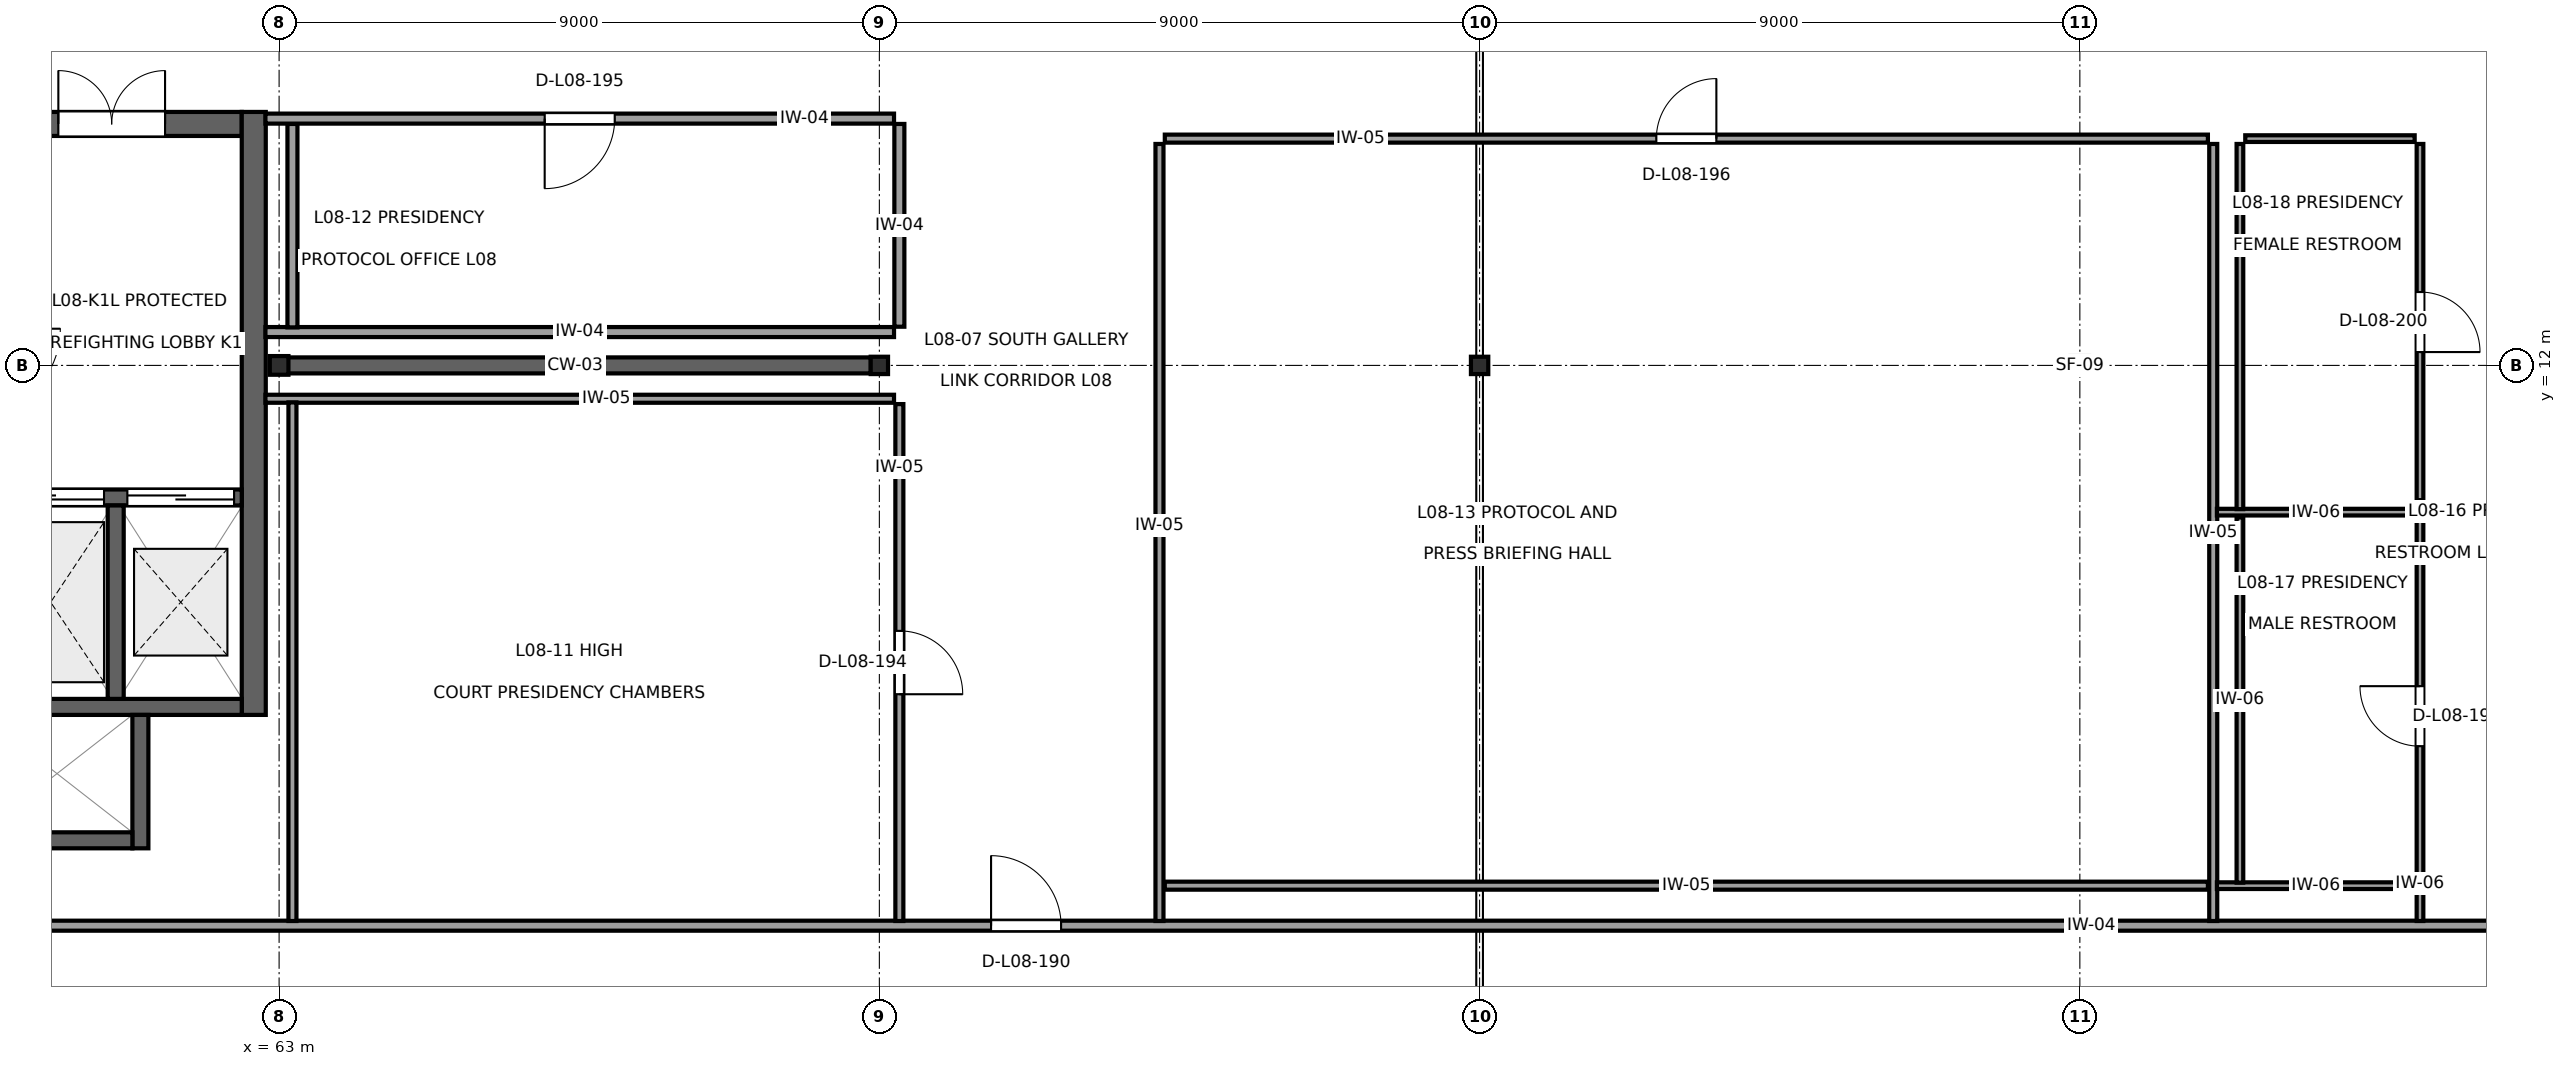
"""IFC4 building model, lengths in metres.
Left out: names, types, materials, properties, quantities, classifications, styles, units other than length and angle.
Written with IfcOpenShell. Run it as: python <this file> out.ifc"""

import sys

from ifc_helpers import new_model, si_unit, direction, frame, frame_2d, origin, origin_2d, place, context, subcontext, project, spatial, rectangle, i_section, extrude, element, fill, save


model = new_model("IFC4")
c1 = context("Model", 3, precision=1e-05, world=origin(), true_north=direction((0.0, 1.0)))
c2 = subcontext(c1, "Body", "Model", "MODEL_VIEW")
j1 = project(units=[si_unit("LENGTHUNIT", "METRE"), si_unit("PLANEANGLEUNIT", "RADIAN")], contexts=[c1])
p1 = place(None, origin())
s1 = spatial("IfcSite", under=j1, at=p1, CompositionType="ELEMENT")
p2 = place(p1, origin())
s2 = spatial("IfcBuilding", under=s1, at=p2, CompositionType="ELEMENT")
p3 = place(p2, frame((0.0, 0.0, 35.4)))
s3 = spatial("IfcBuildingStorey", under=s2, at=p3, CompositionType="ELEMENT", Elevation=35.4)
p4 = place(p3, frame((63.0, 12.0, 0.0), z_axis=(0.0, 0.0, 1.0), x_axis=(1.0, 0.0, 0.0)))
e1 = element("IfcColumn", 1, at=p4, inside=s3, PredefinedType="COLUMN", context=c2, shape_type="SweptSolid", body=[
    extrude(i_section(OverallWidth=0.28, OverallDepth=0.28, WebThickness=0.01, FlangeThickness=0.018, at=origin_2d()), origin(), (0.0, 0.0, 1.0), 3.8),
])
for number, where, z_axis, x_axis in (
    (2, (72.0, 12.0, 0.0), (0.0, 0.0, 1.0), (0.0, 1.0, 0.0)),
    (3, (81.0, 12.0, 0.0), (0.0, 0.0, 1.0), (1.0, 0.0, 0.0)),
):
    element("IfcColumn", number, at=place(p3, frame(where, z_axis=z_axis, x_axis=x_axis)), inside=s3, PredefinedType="COLUMN", context=c2, shape_type="SweptSolid", body=[
        extrude(i_section(OverallWidth=0.26, OverallDepth=0.26, WebThickness=0.01, FlangeThickness=0.018, at=origin_2d()), origin(), (0.0, 0.0, 1.0), 3.8),
    ])
p5 = place(p3, frame((90.0, 12.0, 0.0), z_axis=(0.0, 0.0, 1.0), x_axis=(1.0, 0.0, 0.0)))
e4 = element("IfcColumn", 4, at=p5, inside=s3, PredefinedType="COLUMN", context=c2, shape_type="SweptSolid", body=[
    extrude(i_section(OverallWidth=0.28, OverallDepth=0.28, WebThickness=0.01, FlangeThickness=0.018, at=origin_2d()), origin(), (0.0, 0.0, 1.0), 3.8),
])
p6 = place(p3, frame((58.54, 15.62, 0.0), z_axis=(0.0, 0.0, 1.0), x_axis=(1.0, 0.0, 0.0)))
e5 = element("IfcWall", 5, at=p6, inside=s3, PredefinedType="SHEAR", context=c2, shape_type="SweptSolid", body=[
    extrude(rectangle(XDim=3.9, YDim=0.36, at=frame_2d((1.95, 0.0))), origin(), (0.0, 0.0, 1.0), 3.66),
])
p7 = place(p6, frame((1.15, 0.0, 0.0)))
e6 = element("IfcOpeningElement", 6, at=p7, cuts=e5, PredefinedType="OPENING", context=c2, shape_type="SweptSolid", body=[
    extrude(rectangle(XDim=1.6, YDim=2.25, at=frame_2d((0.8, 1.125))), frame((0.0, 0.195, 0.0), z_axis=(0.0, -1.0, 0.0), x_axis=(1.0, 0.0, 0.0)), (0.0, 0.0, 1.0), 0.39),
])
p8 = place(p3, frame((62.62, 6.76, 0.0), z_axis=(0.0, 0.0, 1.0), x_axis=(0.0, 1.0, 0.0)))
e7 = element("IfcWall", 7, at=p8, inside=s3, PredefinedType="SHEAR", context=c2, shape_type="SweptSolid", body=[
    extrude(rectangle(XDim=9.04, YDim=0.36, at=frame_2d((4.52, 0.0))), origin(), (0.0, 0.0, 1.0), 3.66),
])
p9 = place(p3, frame((58.54, 10.02, 0.0), z_axis=(0.0, 0.0, 1.0), x_axis=(1.0, 0.0, 0.0)))
e8 = element("IfcWall", 8, at=p9, inside=s3, PredefinedType="SHEAR", context=c2, shape_type="SweptSolid", body=[
    extrude(rectangle(XDim=3.9, YDim=0.24, at=frame_2d((1.95, 0.0))), origin(), (0.0, 0.0, 1.0), 3.81),
])
p10 = place(p9, frame((0.235, 0.0, 0.0)))
e9 = element("IfcOpeningElement", 9, at=p10, cuts=e8, PredefinedType="OPENING", context=c2, shape_type="SweptSolid", body=[
    extrude(rectangle(XDim=1.6, YDim=2.3, at=frame_2d((0.8, 1.15))), frame((0.0, 0.135, 0.0), z_axis=(0.0, -1.0, 0.0), x_axis=(1.0, 0.0, 0.0)), (0.0, 0.0, 1.0), 0.27),
])
p11 = place(p9, frame((2.185, 0.0, 0.0)))
e10 = element("IfcOpeningElement", 10, at=p11, cuts=e8, PredefinedType="OPENING", context=c2, shape_type="SweptSolid", body=[
    extrude(rectangle(XDim=1.6, YDim=2.3, at=frame_2d((0.8, 1.15))), frame((0.0, 0.135, 0.0), z_axis=(0.0, -1.0, 0.0), x_axis=(1.0, 0.0, 0.0)), (0.0, 0.0, 1.0), 0.27),
])
p12 = place(p3, frame((58.54, 6.88, 0.0), z_axis=(0.0, 0.0, 1.0), x_axis=(1.0, 0.0, 0.0)))
e11 = element("IfcWall", 11, at=p12, inside=s3, PredefinedType="SHEAR", context=c2, shape_type="SweptSolid", body=[
    extrude(rectangle(XDim=3.9, YDim=0.24, at=frame_2d((1.95, 0.0))), origin(), (0.0, 0.0, 1.0), 3.81),
])
p13 = place(p3, frame((60.55, 7.0, 0.0), z_axis=(0.0, 0.0, 1.0), x_axis=(0.0, 1.0, 0.0)))
e12 = element("IfcWall", 12, at=p13, inside=s3, PredefinedType="SHEAR", context=c2, shape_type="SweptSolid", body=[
    extrude(rectangle(XDim=2.9, YDim=0.24, at=frame_2d((1.45, 0.0))), origin(), (0.0, 0.0, 1.0), 3.81),
])
p14 = place(p3, frame((60.92, 4.76, 0.0), z_axis=(0.0, 0.0, 1.0), x_axis=(0.0, 1.0, 0.0)))
e13 = element("IfcWall", 13, at=p14, inside=s3, PredefinedType="SHEAR", context=c2, shape_type="SweptSolid", body=[
    extrude(rectangle(XDim=2.0, YDim=0.24, at=frame_2d((1.0, 0.0))), origin(), (0.0, 0.0, 1.0), 3.81),
])
p15 = place(p3, frame((58.54, 4.88, 0.0), z_axis=(0.0, 0.0, 1.0), x_axis=(1.0, 0.0, 0.0)))
e14 = element("IfcWall", 14, at=p15, inside=s3, PredefinedType="SHEAR", context=c2, shape_type="SweptSolid", body=[
    extrude(rectangle(XDim=2.26, YDim=0.24, at=frame_2d((1.13, 0.0))), origin(), (0.0, 0.0, 1.0), 3.81),
])
p16 = place(p3, frame((63.008, 12.0, 0.0), z_axis=(0.0, 0.0, 1.0), x_axis=(1.0, 0.0, 0.0)))
e15 = element("IfcWall", 15, at=p16, inside=s3, PredefinedType="SHEAR", context=c2, shape_type="SweptSolid", body=[
    extrude(rectangle(XDim=8.864, YDim=0.24, at=frame_2d((4.432, 0.0))), origin(), (0.0, 0.0, 1.0), 3.255),
])
p17 = place(p3, frame((45.88, 3.6, 0.0), z_axis=(0.0, 0.0, 1.0), x_axis=(1.0, 0.0, 0.0)))
e16 = element("IfcWall", 16, at=p17, inside=s3, PredefinedType="PARTITIONING", context=c2, shape_type="SweptSolid", body=[
    extrude(rectangle(XDim=58.24, YDim=0.15, at=frame_2d((29.12, 0.0))), origin(), (0.0, 0.0, 1.0), 3.64),
])
p18 = place(p17, frame((27.795, 0.0, 0.0)))
e17 = element("IfcOpeningElement", 17, at=p18, cuts=e16, PredefinedType="OPENING", context=c2, shape_type="SweptSolid", body=[
    extrude(rectangle(XDim=1.05, YDim=2.25, at=frame_2d((0.525, 1.125))), frame((0.0, 0.09, 0.0), z_axis=(0.0, -1.0, 0.0), x_axis=(1.0, 0.0, 0.0)), (0.0, 0.0, 1.0), 0.18),
])
p19 = place(p3, frame((62.795, 11.5, 0.0), z_axis=(0.0, 0.0, 1.0), x_axis=(1.0, 0.0, 0.0)))
e18 = element("IfcWall", 18, at=p19, inside=s3, PredefinedType="PARTITIONING", context=c2, shape_type="SweptSolid", body=[
    extrude(rectangle(XDim=9.425, YDim=0.12, at=frame_2d((4.712, 0.0))), origin(), (0.0, 0.0, 1.0), 3.64),
])
p20 = place(p3, frame((72.3, 11.42, 0.0), z_axis=(0.0, 0.0, 1.0), x_axis=(0.0, -1.0, 0.0)))
e19 = element("IfcWall", 19, at=p20, inside=s3, PredefinedType="PARTITIONING", context=c2, shape_type="SweptSolid", body=[
    extrude(rectangle(XDim=7.75, YDim=0.12, at=frame_2d((3.875, 0.0))), origin(), (0.0, 0.0, 1.0), 3.64),
])
p21 = place(p20, frame((3.4, 0.0, 0.0)))
e20 = element("IfcOpeningElement", 20, at=p21, cuts=e19, PredefinedType="OPENING", context=c2, shape_type="SweptSolid", body=[
    extrude(rectangle(XDim=0.95, YDim=2.15, at=frame_2d((0.475, 1.075))), frame((0.0, 0.075, 0.0), z_axis=(0.0, -1.0, 0.0), x_axis=(1.0, 0.0, 0.0)), (0.0, 0.0, 1.0), 0.15),
])
p22 = place(p3, frame((63.2, 3.67, 0.0), z_axis=(0.0, 0.0, 1.0), x_axis=(0.0, 1.0, 0.0)))
e21 = element("IfcWall", 21, at=p22, inside=s3, PredefinedType="PARTITIONING", context=c2, shape_type="SweptSolid", body=[
    extrude(rectangle(XDim=7.775, YDim=0.12, at=frame_2d((3.888, 0.0))), origin(), (0.0, 0.0, 1.0), 3.245),
])
p23 = place(p3, frame((72.3, 15.62, 0.0), z_axis=(0.0, 0.0, 1.0), x_axis=(0.0, -1.0, 0.0)))
e22 = element("IfcWall", 22, at=p23, inside=s3, PredefinedType="PARTITIONING", context=c2, shape_type="SweptSolid", body=[
    extrude(rectangle(XDim=3.04, YDim=0.15, at=frame_2d((1.52, 0.0))), origin(), (0.0, 0.0, 1.0), 3.64),
])
p24 = place(p3, frame((72.22, 12.5, 0.0), z_axis=(0.0, 0.0, 1.0), x_axis=(-1.0, 0.0, 0.0)))
e23 = element("IfcWall", 23, at=p24, inside=s3, PredefinedType="PARTITIONING", context=c2, shape_type="SweptSolid", body=[
    extrude(rectangle(XDim=9.425, YDim=0.15, at=frame_2d((4.712, 0.0))), origin(), (0.0, 0.0, 1.0), 3.64),
])
p25 = place(p3, frame((63.2, 12.57, 0.0), z_axis=(0.0, 0.0, 1.0), x_axis=(0.0, 1.0, 0.0)))
e24 = element("IfcWall", 24, at=p25, inside=s3, PredefinedType="PARTITIONING", context=c2, shape_type="SweptSolid", body=[
    extrude(rectangle(XDim=3.05, YDim=0.15, at=frame_2d((1.525, 0.0))), origin(), (0.0, 0.0, 1.0), 3.245),
])
p26 = place(p3, frame((62.795, 15.7, 0.0), z_axis=(0.0, 0.0, 1.0), x_axis=(1.0, 0.0, 0.0)))
e25 = element("IfcWall", 25, at=p26, inside=s3, PredefinedType="PARTITIONING", context=c2, shape_type="SweptSolid", body=[
    extrude(rectangle(XDim=9.425, YDim=0.15, at=frame_2d((4.712, 0.0))), origin(), (0.0, 0.0, 1.0), 3.64),
])
p27 = place(p26, frame((4.187, 0.0, 0.0)))
e26 = element("IfcOpeningElement", 26, at=p27, cuts=e25, PredefinedType="OPENING", context=c2, shape_type="SweptSolid", body=[
    extrude(rectangle(XDim=1.05, YDim=2.25, at=frame_2d((0.525, 1.125))), frame((0.0, 0.09, 0.0), z_axis=(0.0, -1.0, 0.0), x_axis=(1.0, 0.0, 0.0)), (0.0, 0.0, 1.0), 0.18),
])
p28 = place(p3, frame((91.92, 4.2, 0.0), z_axis=(0.0, 0.0, 1.0), x_axis=(-1.0, 0.0, 0.0)))
e27 = element("IfcWall", 27, at=p28, inside=s3, PredefinedType="PARTITIONING", context=c2, shape_type="SweptSolid", body=[
    extrude(rectangle(XDim=15.64, YDim=0.12, at=frame_2d((7.82, 0.0))), origin(), (0.0, 0.0, 1.0), 3.64),
])
p29 = place(p3, frame((76.2, 3.67, 0.0), z_axis=(0.0, 0.0, 1.0), x_axis=(0.0, 1.0, 0.0)))
e28 = element("IfcWall", 28, at=p29, inside=s3, PredefinedType="PARTITIONING", context=c2, shape_type="SweptSolid", body=[
    extrude(rectangle(XDim=11.65, YDim=0.12, at=frame_2d((5.825, 0.0))), origin(), (0.0, 0.0, 1.0), 3.64),
])
p30 = place(p3, frame((76.28, 15.4, 0.0), z_axis=(0.0, 0.0, 1.0), x_axis=(1.0, 0.0, 0.0)))
e29 = element("IfcWall", 29, at=p30, inside=s3, PredefinedType="PARTITIONING", context=c2, shape_type="SweptSolid", body=[
    extrude(rectangle(XDim=15.64, YDim=0.12, at=frame_2d((7.82, 0.0))), origin(), (0.0, 0.0, 1.0), 3.64),
])
p31 = place(p30, frame((7.37, 0.0, 0.0)))
e30 = element("IfcOpeningElement", 30, at=p31, cuts=e29, PredefinedType="OPENING", context=c2, shape_type="SweptSolid", body=[
    extrude(rectangle(XDim=0.9, YDim=2.1, at=frame_2d((0.45, 1.05))), frame((0.0, 0.075, 0.0), z_axis=(0.0, -1.0, 0.0), x_axis=(1.0, 0.0, 0.0)), (0.0, 0.0, 1.0), 0.15),
])
p32 = place(p3, frame((92.0, 15.32, 0.0), z_axis=(0.0, 0.0, 1.0), x_axis=(0.0, -1.0, 0.0)))
e31 = element("IfcWall", 31, at=p32, inside=s3, PredefinedType="PARTITIONING", context=c2, shape_type="SweptSolid", body=[
    extrude(rectangle(XDim=11.65, YDim=0.12, at=frame_2d((5.825, 0.0))), origin(), (0.0, 0.0, 1.0), 3.64),
])
p33 = place(p3, frame((95.02, 4.2, 0.0), z_axis=(0.0, 0.0, 1.0), x_axis=(-1.0, 0.0, 0.0)))
e32 = element("IfcWall", 32, at=p33, inside=s3, PredefinedType="PARTITIONING", context=c2, shape_type="SweptSolid", body=[
    extrude(rectangle(XDim=2.965, YDim=0.1, at=frame_2d((1.482, 0.0))), origin(), (0.0, 0.0, 1.0), 3.64),
])
p34 = place(p3, frame((92.4, 4.245, 0.0), z_axis=(0.0, 0.0, 1.0), x_axis=(0.0, 1.0, 0.0)))
e33 = element("IfcWall", 33, at=p34, inside=s3, PredefinedType="PARTITIONING", context=c2, shape_type="SweptSolid", body=[
    extrude(rectangle(XDim=5.475, YDim=0.1, at=frame_2d((2.737, 0.0))), origin(), (0.0, 0.0, 1.0), 3.64),
])
p35 = place(p3, frame((92.055, 9.8, 0.0), z_axis=(0.0, 0.0, 1.0), x_axis=(1.0, 0.0, 0.0)))
e34 = element("IfcWall", 34, at=p35, inside=s3, PredefinedType="PARTITIONING", context=c2, shape_type="SweptSolid", body=[
    extrude(rectangle(XDim=2.965, YDim=0.1, at=frame_2d((1.482, 0.0))), origin(), (0.0, 0.0, 1.0), 3.64),
])
p36 = place(p3, frame((95.1, 9.72, 0.0), z_axis=(0.0, 0.0, 1.0), x_axis=(0.0, -1.0, 0.0)))
e35 = element("IfcWall", 35, at=p36, inside=s3, PredefinedType="PARTITIONING", context=c2, shape_type="SweptSolid", body=[
    extrude(rectangle(XDim=6.05, YDim=0.1, at=frame_2d((3.025, 0.0))), origin(), (0.0, 0.0, 1.0), 3.64),
])
p37 = place(p36, frame((2.529, 0.0, 0.0)))
e36 = element("IfcOpeningElement", 36, at=p37, cuts=e35, PredefinedType="OPENING", context=c2, shape_type="SweptSolid", body=[
    extrude(rectangle(XDim=0.9, YDim=2.05, at=frame_2d((0.45, 1.025))), frame((0.0, 0.065, 0.0), z_axis=(0.0, -1.0, 0.0), x_axis=(1.0, 0.0, 0.0)), (0.0, 0.0, 1.0), 0.13),
])
p38 = place(p3, frame((92.48, 15.4, 0.0), z_axis=(0.0, 0.0, 1.0), x_axis=(1.0, 0.0, 0.0)))
e37 = element("IfcWall", 37, at=p38, inside=s3, PredefinedType="PARTITIONING", context=c2, shape_type="SweptSolid", body=[
    extrude(rectangle(XDim=2.54, YDim=0.1, at=frame_2d((1.27, 0.0))), origin(), (0.0, 0.0, 1.0), 3.64),
])
p39 = place(p3, frame((95.1, 15.32, 0.0), z_axis=(0.0, 0.0, 1.0), x_axis=(0.0, -1.0, 0.0)))
e38 = element("IfcWall", 38, at=p39, inside=s3, PredefinedType="PARTITIONING", context=c2, shape_type="SweptSolid", body=[
    extrude(rectangle(XDim=5.34, YDim=0.1, at=frame_2d((2.67, 0.0))), origin(), (0.0, 0.0, 1.0), 3.64),
])
p40 = place(p39, frame((2.22, 0.0, 0.0)))
e39 = element("IfcOpeningElement", 39, at=p40, cuts=e38, PredefinedType="OPENING", context=c2, shape_type="SweptSolid", body=[
    extrude(rectangle(XDim=0.9, YDim=2.05, at=frame_2d((0.45, 1.025))), frame((0.0, 0.065, 0.0), z_axis=(0.0, -1.0, 0.0), x_axis=(1.0, 0.0, 0.0)), (0.0, 0.0, 1.0), 0.13),
])
p41 = place(p3, frame((92.4, 9.845, 0.0), z_axis=(0.0, 0.0, 1.0), x_axis=(0.0, 1.0, 0.0)))
e40 = element("IfcWall", 40, at=p41, inside=s3, PredefinedType="PARTITIONING", context=c2, shape_type="SweptSolid", body=[
    extrude(rectangle(XDim=5.475, YDim=0.1, at=frame_2d((2.738, 0.0))), origin(), (0.0, 0.0, 1.0), 3.64),
])
p42 = place(p7, origin())
e41 = element("IfcDoor", 41, at=p42, inside=s3, OperationType="DOUBLE_DOOR_SINGLE_SWING", PredefinedType="DOOR", context=c2, shape_type="SweptSolid", body=[
    extrude(rectangle(XDim=1.6, YDim=2.25, at=frame_2d((0.8, 1.125))), frame((0.0, 0.025, 0.0), z_axis=(0.0, -1.0, 0.0), x_axis=(1.0, 0.0, 0.0)), (0.0, 0.0, 1.0), 0.05),
])
fill(e6, e41)
p43 = place(p10, origin())
e42 = element("IfcDoor", 42, at=p43, inside=s3, OperationType="DOUBLE_DOOR_SLIDING", PredefinedType="DOOR", context=c2, shape_type="SweptSolid", body=[
    extrude(rectangle(XDim=1.6, YDim=2.3, at=frame_2d((0.8, 1.15))), frame((0.0, 0.025, 0.0), z_axis=(0.0, -1.0, 0.0), x_axis=(1.0, 0.0, 0.0)), (0.0, 0.0, 1.0), 0.05),
])
fill(e9, e42)
p44 = place(p11, origin())
e43 = element("IfcDoor", 43, at=p44, inside=s3, OperationType="DOUBLE_DOOR_SLIDING", PredefinedType="DOOR", context=c2, shape_type="SweptSolid", body=[
    extrude(rectangle(XDim=1.6, YDim=2.3, at=frame_2d((0.8, 1.15))), frame((0.0, 0.025, 0.0), z_axis=(0.0, -1.0, 0.0), x_axis=(1.0, 0.0, 0.0)), (0.0, 0.0, 1.0), 0.05),
])
fill(e10, e43)
p45 = place(p18, origin())
e44 = element("IfcDoor", 44, at=p45, inside=s3, OperationType="SINGLE_SWING_LEFT", PredefinedType="DOOR", context=c2, shape_type="SweptSolid", body=[
    extrude(rectangle(XDim=1.05, YDim=2.25, at=frame_2d((0.525, 1.125))), frame((0.0, 0.025, 0.0), z_axis=(0.0, -1.0, 0.0), x_axis=(1.0, 0.0, 0.0)), (0.0, 0.0, 1.0), 0.05),
])
fill(e17, e44)
p46 = place(p21, origin())
e45 = element("IfcDoor", 45, at=p46, inside=s3, OperationType="SINGLE_SWING_RIGHT", PredefinedType="DOOR", context=c2, shape_type="SweptSolid", body=[
    extrude(rectangle(XDim=0.95, YDim=2.15, at=frame_2d((0.475, 1.075))), frame((0.0, 0.025, 0.0), z_axis=(0.0, -1.0, 0.0), x_axis=(1.0, 0.0, 0.0)), (0.0, 0.0, 1.0), 0.05),
])
fill(e20, e45)
p47 = place(p27, frame((1.05, 0.0, 0.0), z_axis=(0.0, 0.0, 1.0), x_axis=(-1.0, 0.0, 0.0)))
e46 = element("IfcDoor", 46, at=p47, inside=s3, OperationType="SINGLE_SWING_LEFT", PredefinedType="DOOR", context=c2, shape_type="SweptSolid", body=[
    extrude(rectangle(XDim=1.05, YDim=2.25, at=frame_2d((0.525, 1.125))), frame((0.0, 0.025, 0.0), z_axis=(0.0, -1.0, 0.0), x_axis=(1.0, 0.0, 0.0)), (0.0, 0.0, 1.0), 0.05),
])
fill(e26, e46)
p48 = place(p31, origin())
e47 = element("IfcDoor", 47, at=p48, inside=s3, OperationType="SINGLE_SWING_RIGHT", PredefinedType="DOOR", context=c2, shape_type="SweptSolid", body=[
    extrude(rectangle(XDim=0.9, YDim=2.1, at=frame_2d((0.45, 1.05))), frame((0.0, 0.025, 0.0), z_axis=(0.0, -1.0, 0.0), x_axis=(1.0, 0.0, 0.0)), (0.0, 0.0, 1.0), 0.05),
])
fill(e30, e47)
p49 = place(p37, frame((0.9, 0.0, 0.0), z_axis=(0.0, 0.0, 1.0), x_axis=(-1.0, 0.0, 0.0)))
e48 = element("IfcDoor", 48, at=p49, inside=s3, OperationType="SINGLE_SWING_LEFT", PredefinedType="DOOR", context=c2, shape_type="SweptSolid", body=[
    extrude(rectangle(XDim=0.9, YDim=2.05, at=frame_2d((0.45, 1.025))), frame((0.0, 0.025, 0.0), z_axis=(0.0, -1.0, 0.0), x_axis=(1.0, 0.0, 0.0)), (0.0, 0.0, 1.0), 0.05),
])
fill(e36, e48)
p50 = place(p40, origin())
e49 = element("IfcDoor", 49, at=p50, inside=s3, OperationType="SINGLE_SWING_RIGHT", PredefinedType="DOOR", context=c2, shape_type="SweptSolid", body=[
    extrude(rectangle(XDim=0.9, YDim=2.05, at=frame_2d((0.45, 1.025))), frame((0.0, 0.025, 0.0), z_axis=(0.0, -1.0, 0.0), x_axis=(1.0, 0.0, 0.0)), (0.0, 0.0, 1.0), 0.05),
])
fill(e39, e49)
save(model, sys.argv[1])
